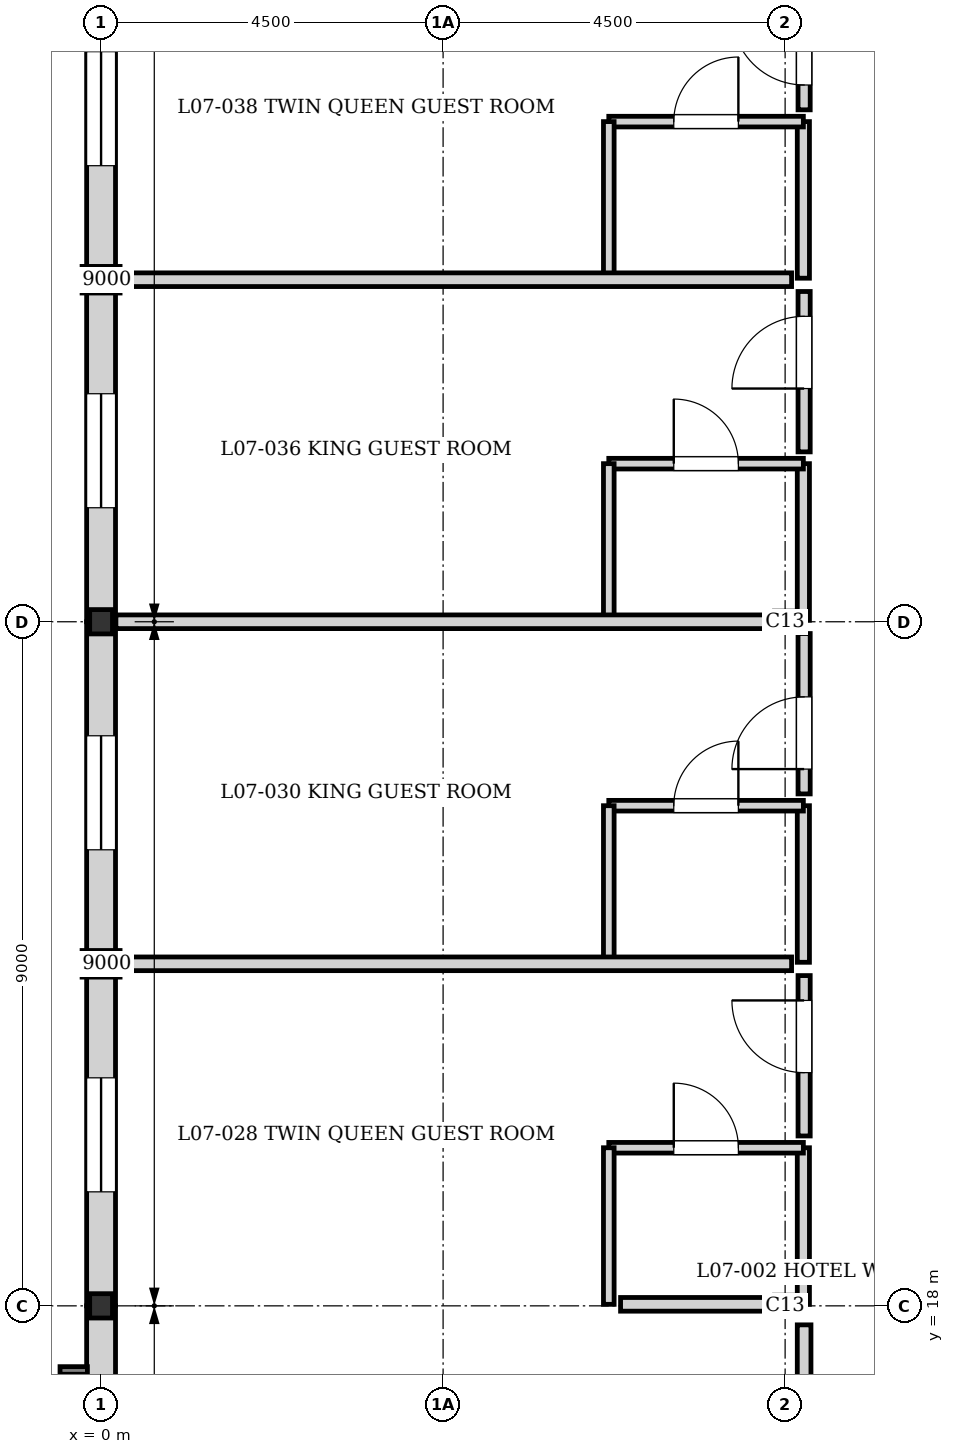
"""IFC4 building model, lengths in metres.
Left out: names, types, materials, properties, quantities, classifications, styles, units other than length and angle.
Written with IfcOpenShell. Run it as: python <this file> out.ifc"""

import sys

from ifc_helpers import new_model, si_unit, direction, frame, frame_2d, origin, origin_2d, place, context, subcontext, project, spatial, rectangle, i_section, extrude, element, fill, save


model = new_model("IFC4")
c1 = context("Model", 3, precision=1e-05, world=origin(), true_north=direction((0.0, 1.0)))
c2 = subcontext(c1, "Body", "Model", "MODEL_VIEW")
j1 = project(units=[si_unit("LENGTHUNIT", "METRE"), si_unit("PLANEANGLEUNIT", "RADIAN")], contexts=[c1])
p1 = place(None, origin())
s1 = spatial("IfcSite", under=j1, at=p1, CompositionType="ELEMENT")
p2 = place(p1, origin())
s2 = spatial("IfcBuilding", under=s1, at=p2, CompositionType="ELEMENT")
p3 = place(p2, frame((0.0, 0.0, 23.68)))
s3 = spatial("IfcBuildingStorey", under=s2, at=p3, CompositionType="ELEMENT", Elevation=23.68)
for number, where, z_axis, x_axis in (
    (1, (0.0, 18.0, 0.0), (0.0, 0.0, 1.0), (1.0, 0.0, 0.0)),
    (2, (0.0, 27.0, 0.0), (0.0, 0.0, 1.0), (1.0, 0.0, 0.0)),
):
    element("IfcColumn", number, at=place(p3, frame(where, z_axis=z_axis, x_axis=x_axis)), inside=s3, PredefinedType="COLUMN", context=c2, shape_type="SweptSolid", body=[
        extrude(i_section(OverallWidth=0.3, OverallDepth=0.32, WebThickness=0.011, FlangeThickness=0.021, at=origin_2d()), origin(), (0.0, 0.0, 1.0), 3.2),
    ])
for number, where, z_axis, x_axis in (
    (3, (9.0, 18.0, 0.0), (0.0, 0.0, 1.0), (1.0, 0.0, 0.0)),
    (4, (9.0, 27.0, 0.0), (0.0, 0.0, 1.0), (1.0, 0.0, 0.0)),
):
    element("IfcColumn", number, at=place(p3, frame(where, z_axis=z_axis, x_axis=x_axis)), inside=s3, PredefinedType="COLUMN", context=c2, shape_type="SweptSolid", body=[
        extrude(i_section(OverallWidth=0.28, OverallDepth=0.28, WebThickness=0.01, FlangeThickness=0.018, at=origin_2d()), origin(), (0.0, 0.0, 1.0), 3.2),
    ])
for number, where, z_axis, x_axis in (
    (5, (0.0, 22.5, 0.0), (0.0, 0.0, 1.0), (0.0, 1.0, 0.0)),
    (6, (0.0, 31.5, 0.0), (0.0, 0.0, 1.0), (0.0, 1.0, 0.0)),
):
    element("IfcColumn", number, at=place(p3, frame(where, z_axis=z_axis, x_axis=x_axis)), inside=s3, PredefinedType="PILASTER", context=c2, shape_type="SweptSolid", body=[
        extrude(rectangle(XDim=0.35, YDim=0.5, at=origin_2d()), origin(), (0.0, 0.0, 1.0), 3.2),
    ])
p4 = place(p3, frame((0.0, 9.0, 0.0), z_axis=(0.0, 0.0, 1.0), x_axis=(0.0, 1.0, 0.0)))
e7 = element("IfcWall", 7, at=p4, inside=s3, PredefinedType="SOLIDWALL", context=c2, shape_type="SweptSolid", body=[
    extrude(rectangle(XDim=9.0, YDim=0.38, at=frame_2d((4.5, 0.0))), origin(), (0.0, 0.0, 1.0), 2.56),
])
p5 = place(p4, frame((1.5, 0.0, 0.35)))
e8 = element("IfcOpeningElement", 8, at=p5, cuts=e7, PredefinedType="OPENING", context=c2, shape_type="SweptSolid", body=[
    extrude(rectangle(XDim=1.5, YDim=1.8, at=frame_2d((0.75, 0.9))), frame((0.0, 0.2, 0.0), z_axis=(0.0, -1.0, 0.0), x_axis=(1.0, 0.0, 0.0)), (0.0, 0.0, 1.0), 0.4),
])
p6 = place(p4, frame((6.0, 0.0, 0.35)))
e9 = element("IfcOpeningElement", 9, at=p6, cuts=e7, PredefinedType="OPENING", context=c2, shape_type="SweptSolid", body=[
    extrude(rectangle(XDim=1.5, YDim=1.8, at=frame_2d((0.75, 0.9))), frame((0.0, 0.2, 0.0), z_axis=(0.0, -1.0, 0.0), x_axis=(1.0, 0.0, 0.0)), (0.0, 0.0, 1.0), 0.4),
])
p7 = place(p3, frame((0.0, 18.0, 0.0), z_axis=(0.0, 0.0, 1.0), x_axis=(0.0, 1.0, 0.0)))
e10 = element("IfcWall", 10, at=p7, inside=s3, PredefinedType="SOLIDWALL", context=c2, shape_type="SweptSolid", body=[
    extrude(rectangle(XDim=9.0, YDim=0.38, at=frame_2d((4.5, 0.0))), origin(), (0.0, 0.0, 1.0), 2.96),
])
p8 = place(p7, frame((1.5, 0.0, 0.35)))
e11 = element("IfcOpeningElement", 11, at=p8, cuts=e10, PredefinedType="OPENING", context=c2, shape_type="SweptSolid", body=[
    extrude(rectangle(XDim=1.5, YDim=1.8, at=frame_2d((0.75, 0.9))), frame((0.0, 0.2, 0.0), z_axis=(0.0, -1.0, 0.0), x_axis=(1.0, 0.0, 0.0)), (0.0, 0.0, 1.0), 0.4),
])
p9 = place(p7, frame((6.0, 0.0, 0.35)))
e12 = element("IfcOpeningElement", 12, at=p9, cuts=e10, PredefinedType="OPENING", context=c2, shape_type="SweptSolid", body=[
    extrude(rectangle(XDim=1.5, YDim=1.8, at=frame_2d((0.75, 0.9))), frame((0.0, 0.2, 0.0), z_axis=(0.0, -1.0, 0.0), x_axis=(1.0, 0.0, 0.0)), (0.0, 0.0, 1.0), 0.4),
])
p10 = place(p3, frame((0.0, 27.0, 0.0), z_axis=(0.0, 0.0, 1.0), x_axis=(0.0, 1.0, 0.0)))
e13 = element("IfcWall", 13, at=p10, inside=s3, PredefinedType="SOLIDWALL", context=c2, shape_type="SweptSolid", body=[
    extrude(rectangle(XDim=8.87, YDim=0.38, at=frame_2d((4.435, 0.0))), origin(), (0.0, 0.0, 1.0), 2.66),
])
p11 = place(p10, frame((1.5, 0.0, 0.35)))
e14 = element("IfcOpeningElement", 14, at=p11, cuts=e13, PredefinedType="OPENING", context=c2, shape_type="SweptSolid", body=[
    extrude(rectangle(XDim=1.5, YDim=1.8, at=frame_2d((0.75, 0.9))), frame((0.0, 0.2, 0.0), z_axis=(0.0, -1.0, 0.0), x_axis=(1.0, 0.0, 0.0)), (0.0, 0.0, 1.0), 0.4),
])
p12 = place(p10, frame((6.0, 0.0, 0.35)))
e15 = element("IfcOpeningElement", 15, at=p12, cuts=e13, PredefinedType="OPENING", context=c2, shape_type="SweptSolid", body=[
    extrude(rectangle(XDim=1.5, YDim=1.8, at=frame_2d((0.75, 0.9))), frame((0.0, 0.2, 0.0), z_axis=(0.0, -1.0, 0.0), x_axis=(1.0, 0.0, 0.0)), (0.0, 0.0, 1.0), 0.4),
])
p13 = place(p3, frame((9.24, 18.02, 0.0), z_axis=(0.0, 0.0, 1.0), x_axis=(0.0, 1.0, 0.0)))
e16 = element("IfcWall", 16, at=p13, inside=s3, PredefinedType="PARTITIONING", context=c2, shape_type="SweptSolid", body=[
    extrude(rectangle(XDim=2.06, YDim=0.16, at=frame_2d((1.03, 0.0))), origin(), (0.0, 0.0, 1.0), 2.96),
])
p14 = place(p3, frame((6.68, 20.08, 0.0), z_axis=(0.0, 0.0, 1.0), x_axis=(1.0, 0.0, 0.0)))
e17 = element("IfcWall", 17, at=p14, inside=s3, PredefinedType="PLUMBINGWALL", context=c2, shape_type="SweptSolid", body=[
    extrude(rectangle(XDim=2.56, YDim=0.14, at=frame_2d((1.28, 0.0))), origin(), (0.0, 0.0, 1.0), 2.96),
])
p15 = place(p14, frame((0.855, 0.0, 0.0)))
e18 = element("IfcOpeningElement", 18, at=p15, cuts=e17, PredefinedType="OPENING", context=c2, shape_type="SweptSolid", body=[
    extrude(rectangle(XDim=0.85, YDim=2.04, at=frame_2d((0.425, 1.02))), frame((0.0, 0.08, 0.0), z_axis=(0.0, -1.0, 0.0), x_axis=(1.0, 0.0, 0.0)), (0.0, 0.0, 1.0), 0.16),
])
p16 = place(p3, frame((6.68, 18.02, 0.0), z_axis=(0.0, 0.0, 1.0), x_axis=(0.0, 1.0, 0.0)))
e19 = element("IfcWall", 19, at=p16, inside=s3, PredefinedType="PLUMBINGWALL", context=c2, shape_type="SweptSolid", body=[
    extrude(rectangle(XDim=2.06, YDim=0.14, at=frame_2d((1.03, 0.0))), origin(), (0.0, 0.0, 1.0), 2.96),
])
p17 = place(p3, frame((9.24, 22.52, 0.0), z_axis=(0.0, 0.0, 1.0), x_axis=(0.0, 1.0, 0.0)))
e20 = element("IfcWall", 20, at=p17, inside=s3, PredefinedType="PARTITIONING", context=c2, shape_type="SweptSolid", body=[
    extrude(rectangle(XDim=2.06, YDim=0.16, at=frame_2d((1.03, 0.0))), origin(), (0.0, 0.0, 1.0), 2.96),
])
p18 = place(p3, frame((6.68, 24.58, 0.0), z_axis=(0.0, 0.0, 1.0), x_axis=(1.0, 0.0, 0.0)))
e21 = element("IfcWall", 21, at=p18, inside=s3, PredefinedType="PLUMBINGWALL", context=c2, shape_type="SweptSolid", body=[
    extrude(rectangle(XDim=2.56, YDim=0.14, at=frame_2d((1.28, 0.0))), origin(), (0.0, 0.0, 1.0), 2.96),
])
p19 = place(p18, frame((0.855, 0.0, 0.0)))
e22 = element("IfcOpeningElement", 22, at=p19, cuts=e21, PredefinedType="OPENING", context=c2, shape_type="SweptSolid", body=[
    extrude(rectangle(XDim=0.85, YDim=2.04, at=frame_2d((0.425, 1.02))), frame((0.0, 0.08, 0.0), z_axis=(0.0, -1.0, 0.0), x_axis=(1.0, 0.0, 0.0)), (0.0, 0.0, 1.0), 0.16),
])
p20 = place(p3, frame((6.68, 22.52, 0.0), z_axis=(0.0, 0.0, 1.0), x_axis=(0.0, 1.0, 0.0)))
e23 = element("IfcWall", 23, at=p20, inside=s3, PredefinedType="PLUMBINGWALL", context=c2, shape_type="SweptSolid", body=[
    extrude(rectangle(XDim=2.06, YDim=0.14, at=frame_2d((1.03, 0.0))), origin(), (0.0, 0.0, 1.0), 2.96),
])
p21 = place(p3, frame((9.24, 27.02, 0.0), z_axis=(0.0, 0.0, 1.0), x_axis=(0.0, 1.0, 0.0)))
e24 = element("IfcWall", 24, at=p21, inside=s3, PredefinedType="PARTITIONING", context=c2, shape_type="SweptSolid", body=[
    extrude(rectangle(XDim=2.06, YDim=0.16, at=frame_2d((1.03, 0.0))), origin(), (0.0, 0.0, 1.0), 2.96),
])
p22 = place(p3, frame((6.68, 29.08, 0.0), z_axis=(0.0, 0.0, 1.0), x_axis=(1.0, 0.0, 0.0)))
e25 = element("IfcWall", 25, at=p22, inside=s3, PredefinedType="PLUMBINGWALL", context=c2, shape_type="SweptSolid", body=[
    extrude(rectangle(XDim=2.56, YDim=0.14, at=frame_2d((1.28, 0.0))), origin(), (0.0, 0.0, 1.0), 2.96),
])
p23 = place(p22, frame((0.855, 0.0, 0.0)))
e26 = element("IfcOpeningElement", 26, at=p23, cuts=e25, PredefinedType="OPENING", context=c2, shape_type="SweptSolid", body=[
    extrude(rectangle(XDim=0.85, YDim=2.04, at=frame_2d((0.425, 1.02))), frame((0.0, 0.08, 0.0), z_axis=(0.0, -1.0, 0.0), x_axis=(1.0, 0.0, 0.0)), (0.0, 0.0, 1.0), 0.16),
])
p24 = place(p3, frame((6.68, 27.02, 0.0), z_axis=(0.0, 0.0, 1.0), x_axis=(0.0, 1.0, 0.0)))
e27 = element("IfcWall", 27, at=p24, inside=s3, PredefinedType="PLUMBINGWALL", context=c2, shape_type="SweptSolid", body=[
    extrude(rectangle(XDim=2.06, YDim=0.14, at=frame_2d((1.03, 0.0))), origin(), (0.0, 0.0, 1.0), 2.96),
])
p25 = place(p3, frame((9.24, 31.52, 0.0), z_axis=(0.0, 0.0, 1.0), x_axis=(0.0, 1.0, 0.0)))
e28 = element("IfcWall", 28, at=p25, inside=s3, PredefinedType="PARTITIONING", context=c2, shape_type="SweptSolid", body=[
    extrude(rectangle(XDim=2.06, YDim=0.16, at=frame_2d((1.03, 0.0))), origin(), (0.0, 0.0, 1.0), 2.96),
])
p26 = place(p3, frame((6.68, 33.58, 0.0), z_axis=(0.0, 0.0, 1.0), x_axis=(1.0, 0.0, 0.0)))
e29 = element("IfcWall", 29, at=p26, inside=s3, PredefinedType="PLUMBINGWALL", context=c2, shape_type="SweptSolid", body=[
    extrude(rectangle(XDim=2.56, YDim=0.14, at=frame_2d((1.28, 0.0))), origin(), (0.0, 0.0, 1.0), 2.96),
])
p27 = place(p26, frame((0.855, 0.0, 0.0)))
e30 = element("IfcOpeningElement", 30, at=p27, cuts=e29, PredefinedType="OPENING", context=c2, shape_type="SweptSolid", body=[
    extrude(rectangle(XDim=0.85, YDim=2.04, at=frame_2d((0.425, 1.02))), frame((0.0, 0.08, 0.0), z_axis=(0.0, -1.0, 0.0), x_axis=(1.0, 0.0, 0.0)), (0.0, 0.0, 1.0), 0.16),
])
p28 = place(p3, frame((6.68, 31.52, 0.0), z_axis=(0.0, 0.0, 1.0), x_axis=(0.0, 1.0, 0.0)))
e31 = element("IfcWall", 31, at=p28, inside=s3, PredefinedType="PLUMBINGWALL", context=c2, shape_type="SweptSolid", body=[
    extrude(rectangle(XDim=2.06, YDim=0.14, at=frame_2d((1.03, 0.0))), origin(), (0.0, 0.0, 1.0), 2.96),
])
p29 = place(p3, frame((9.25, 11.45, 0.0), z_axis=(0.0, 0.0, 1.0), x_axis=(0.0, 1.0, 0.0)))
e32 = element("IfcWall", 32, at=p29, inside=s3, PredefinedType="PARTITIONING", context=c2, shape_type="SweptSolid", body=[
    extrude(rectangle(XDim=6.3, YDim=0.18, at=frame_2d((3.15, 0.0))), origin(), (0.0, 0.0, 1.0), 2.96),
])
p30 = place(p3, frame((0.195, 22.5, 0.0), z_axis=(0.0, 0.0, 1.0), x_axis=(1.0, 0.0, 0.0)))
e33 = element("IfcWall", 33, at=p30, inside=s3, PredefinedType="PARTITIONING", context=c2, shape_type="SweptSolid", body=[
    extrude(rectangle(XDim=8.89, YDim=0.18, at=frame_2d((4.445, 0.0))), origin(), (0.0, 0.0, 1.0), 2.96),
])
p31 = place(p3, frame((0.195, 27.0, 0.0), z_axis=(0.0, 0.0, 1.0), x_axis=(1.0, 0.0, 0.0)))
e34 = element("IfcWall", 34, at=p31, inside=s3, PredefinedType="PARTITIONING", context=c2, shape_type="SweptSolid", body=[
    extrude(rectangle(XDim=8.89, YDim=0.18, at=frame_2d((4.445, 0.0))), origin(), (0.0, 0.0, 1.0), 2.6),
])
p32 = place(p3, frame((0.195, 31.5, 0.0), z_axis=(0.0, 0.0, 1.0), x_axis=(1.0, 0.0, 0.0)))
e35 = element("IfcWall", 35, at=p32, inside=s3, PredefinedType="PARTITIONING", context=c2, shape_type="SweptSolid", body=[
    extrude(rectangle(XDim=8.89, YDim=0.18, at=frame_2d((4.445, 0.0))), origin(), (0.0, 0.0, 1.0), 2.96),
])
p33 = place(p3, frame((6.835, 18.02, 0.0), z_axis=(0.0, 0.0, 1.0), x_axis=(1.0, 0.0, 0.0)))
e36 = element("IfcWall", 36, at=p33, inside=s3, PredefinedType="PARTITIONING", context=c2, shape_type="SweptSolid", body=[
    extrude(rectangle(XDim=2.26, YDim=0.18, at=frame_2d((1.13, 0.0))), origin(), (0.0, 0.0, 1.0), 2.66),
])
p34 = place(p3, frame((9.25, 20.235, 0.0), z_axis=(0.0, 0.0, 1.0), x_axis=(0.0, 1.0, 0.0)))
e37 = element("IfcWall", 37, at=p34, inside=s3, PredefinedType="PARTITIONING", context=c2, shape_type="SweptSolid", body=[
    extrude(rectangle(XDim=2.11, YDim=0.16, at=frame_2d((1.055, 0.0))), origin(), (0.0, 0.0, 1.0), 2.96),
])
p35 = place(p34, frame((0.833, 0.0, 0.0)))
e38 = element("IfcOpeningElement", 38, at=p35, cuts=e37, PredefinedType="OPENING", context=c2, shape_type="SweptSolid", body=[
    extrude(rectangle(XDim=0.95, YDim=2.15, at=frame_2d((0.475, 1.075))), frame((0.0, 0.09, 0.0), z_axis=(0.0, -1.0, 0.0), x_axis=(1.0, 0.0, 0.0)), (0.0, 0.0, 1.0), 0.18),
])
p36 = place(p3, frame((9.25, 24.735, 0.0), z_axis=(0.0, 0.0, 1.0), x_axis=(0.0, 1.0, 0.0)))
e39 = element("IfcWall", 39, at=p36, inside=s3, PredefinedType="PARTITIONING", context=c2, shape_type="SweptSolid", body=[
    extrude(rectangle(XDim=2.11, YDim=0.16, at=frame_2d((1.055, 0.0))), origin(), (0.0, 0.0, 1.0), 2.96),
])
p37 = place(p36, frame((0.327, 0.0, 0.0)))
e40 = element("IfcOpeningElement", 40, at=p37, cuts=e39, PredefinedType="OPENING", context=c2, shape_type="SweptSolid", body=[
    extrude(rectangle(XDim=0.95, YDim=2.15, at=frame_2d((0.475, 1.075))), frame((0.0, 0.09, 0.0), z_axis=(0.0, -1.0, 0.0), x_axis=(1.0, 0.0, 0.0)), (0.0, 0.0, 1.0), 0.18),
])
p38 = place(p3, frame((9.25, 29.235, 0.0), z_axis=(0.0, 0.0, 1.0), x_axis=(0.0, 1.0, 0.0)))
e41 = element("IfcWall", 41, at=p38, inside=s3, PredefinedType="PARTITIONING", context=c2, shape_type="SweptSolid", body=[
    extrude(rectangle(XDim=2.11, YDim=0.16, at=frame_2d((1.055, 0.0))), origin(), (0.0, 0.0, 1.0), 2.96),
])
p39 = place(p38, frame((0.833, 0.0, 0.0)))
e42 = element("IfcOpeningElement", 42, at=p39, cuts=e41, PredefinedType="OPENING", context=c2, shape_type="SweptSolid", body=[
    extrude(rectangle(XDim=0.95, YDim=2.15, at=frame_2d((0.475, 1.075))), frame((0.0, 0.09, 0.0), z_axis=(0.0, -1.0, 0.0), x_axis=(1.0, 0.0, 0.0)), (0.0, 0.0, 1.0), 0.18),
])
p40 = place(p3, frame((9.25, 33.735, 0.0), z_axis=(0.0, 0.0, 1.0), x_axis=(0.0, 1.0, 0.0)))
e43 = element("IfcWall", 43, at=p40, inside=s3, PredefinedType="PARTITIONING", context=c2, shape_type="SweptSolid", body=[
    extrude(rectangle(XDim=2.11, YDim=0.16, at=frame_2d((1.055, 0.0))), origin(), (0.0, 0.0, 1.0), 2.96),
])
p41 = place(p40, frame((0.327, 0.0, 0.0)))
e44 = element("IfcOpeningElement", 44, at=p41, cuts=e43, PredefinedType="OPENING", context=c2, shape_type="SweptSolid", body=[
    extrude(rectangle(XDim=0.95, YDim=2.15, at=frame_2d((0.475, 1.075))), frame((0.0, 0.09, 0.0), z_axis=(0.0, -1.0, 0.0), x_axis=(1.0, 0.0, 0.0)), (0.0, 0.0, 1.0), 0.18),
])
p42 = place(p8, origin())
e45 = element("IfcWindow", 45, at=p42, inside=s3, PartitioningType="SINGLE_PANEL", PredefinedType="WINDOW", context=c2, shape_type="SweptSolid", body=[
    extrude(rectangle(XDim=1.5, YDim=1.8, at=frame_2d((0.75, 0.9))), frame((0.0, 0.03, 0.0), z_axis=(0.0, -1.0, 0.0), x_axis=(1.0, 0.0, 0.0)), (0.0, 0.0, 1.0), 0.06),
])
fill(e11, e45)
p43 = place(p9, origin())
e46 = element("IfcWindow", 46, at=p43, inside=s3, PartitioningType="SINGLE_PANEL", PredefinedType="WINDOW", context=c2, shape_type="SweptSolid", body=[
    extrude(rectangle(XDim=1.5, YDim=1.8, at=frame_2d((0.75, 0.9))), frame((0.0, 0.03, 0.0), z_axis=(0.0, -1.0, 0.0), x_axis=(1.0, 0.0, 0.0)), (0.0, 0.0, 1.0), 0.06),
])
fill(e12, e46)
p44 = place(p11, origin())
e47 = element("IfcWindow", 47, at=p44, inside=s3, PartitioningType="SINGLE_PANEL", PredefinedType="WINDOW", context=c2, shape_type="SweptSolid", body=[
    extrude(rectangle(XDim=1.5, YDim=1.8, at=frame_2d((0.75, 0.9))), frame((0.0, 0.03, 0.0), z_axis=(0.0, -1.0, 0.0), x_axis=(1.0, 0.0, 0.0)), (0.0, 0.0, 1.0), 0.06),
])
fill(e14, e47)
p45 = place(p12, origin())
e48 = element("IfcWindow", 48, at=p45, inside=s3, PartitioningType="SINGLE_PANEL", PredefinedType="WINDOW", context=c2, shape_type="SweptSolid", body=[
    extrude(rectangle(XDim=1.5, YDim=1.8, at=frame_2d((0.75, 0.9))), frame((0.0, 0.03, 0.0), z_axis=(0.0, -1.0, 0.0), x_axis=(1.0, 0.0, 0.0)), (0.0, 0.0, 1.0), 0.06),
])
fill(e15, e48)
p46 = place(p15, origin())
e49 = element("IfcDoor", 49, at=p46, inside=s3, OperationType="SINGLE_SWING_LEFT", PredefinedType="DOOR", context=c2, shape_type="SweptSolid", body=[
    extrude(rectangle(XDim=0.85, YDim=2.04, at=frame_2d((0.425, 1.02))), frame((0.0, 0.025, 0.0), z_axis=(0.0, -1.0, 0.0), x_axis=(1.0, 0.0, 0.0)), (0.0, 0.0, 1.0), 0.05),
])
fill(e18, e49)
p47 = place(p19, origin())
e50 = element("IfcDoor", 50, at=p47, inside=s3, OperationType="SINGLE_SWING_RIGHT", PredefinedType="DOOR", context=c2, shape_type="SweptSolid", body=[
    extrude(rectangle(XDim=0.85, YDim=2.04, at=frame_2d((0.425, 1.02))), frame((0.0, 0.025, 0.0), z_axis=(0.0, -1.0, 0.0), x_axis=(1.0, 0.0, 0.0)), (0.0, 0.0, 1.0), 0.05),
])
fill(e22, e50)
p48 = place(p23, origin())
e51 = element("IfcDoor", 51, at=p48, inside=s3, OperationType="SINGLE_SWING_LEFT", PredefinedType="DOOR", context=c2, shape_type="SweptSolid", body=[
    extrude(rectangle(XDim=0.85, YDim=2.04, at=frame_2d((0.425, 1.02))), frame((0.0, 0.025, 0.0), z_axis=(0.0, -1.0, 0.0), x_axis=(1.0, 0.0, 0.0)), (0.0, 0.0, 1.0), 0.05),
])
fill(e26, e51)
p49 = place(p27, origin())
e52 = element("IfcDoor", 52, at=p49, inside=s3, OperationType="SINGLE_SWING_RIGHT", PredefinedType="DOOR", context=c2, shape_type="SweptSolid", body=[
    extrude(rectangle(XDim=0.85, YDim=2.04, at=frame_2d((0.425, 1.02))), frame((0.0, 0.025, 0.0), z_axis=(0.0, -1.0, 0.0), x_axis=(1.0, 0.0, 0.0)), (0.0, 0.0, 1.0), 0.05),
])
fill(e30, e52)
p50 = place(p35, origin())
e53 = element("IfcDoor", 53, at=p50, inside=s3, OperationType="SINGLE_SWING_RIGHT", PredefinedType="DOOR", context=c2, shape_type="SweptSolid", body=[
    extrude(rectangle(XDim=0.95, YDim=2.15, at=frame_2d((0.475, 1.075))), frame((0.0, 0.025, 0.0), z_axis=(0.0, -1.0, 0.0), x_axis=(1.0, 0.0, 0.0)), (0.0, 0.0, 1.0), 0.05),
])
fill(e38, e53)
p51 = place(p37, origin())
e54 = element("IfcDoor", 54, at=p51, inside=s3, OperationType="SINGLE_SWING_LEFT", PredefinedType="DOOR", context=c2, shape_type="SweptSolid", body=[
    extrude(rectangle(XDim=0.95, YDim=2.15, at=frame_2d((0.475, 1.075))), frame((0.0, 0.025, 0.0), z_axis=(0.0, -1.0, 0.0), x_axis=(1.0, 0.0, 0.0)), (0.0, 0.0, 1.0), 0.05),
])
fill(e40, e54)
p52 = place(p39, origin())
e55 = element("IfcDoor", 55, at=p52, inside=s3, OperationType="SINGLE_SWING_LEFT", PredefinedType="DOOR", context=c2, shape_type="SweptSolid", body=[
    extrude(rectangle(XDim=0.95, YDim=2.15, at=frame_2d((0.475, 1.075))), frame((0.0, 0.025, 0.0), z_axis=(0.0, -1.0, 0.0), x_axis=(1.0, 0.0, 0.0)), (0.0, 0.0, 1.0), 0.05),
])
fill(e42, e55)
p53 = place(p41, origin())
e56 = element("IfcDoor", 56, at=p53, inside=s3, OperationType="SINGLE_SWING_RIGHT", PredefinedType="DOOR", context=c2, shape_type="SweptSolid", body=[
    extrude(rectangle(XDim=0.95, YDim=2.15, at=frame_2d((0.475, 1.075))), frame((0.0, 0.025, 0.0), z_axis=(0.0, -1.0, 0.0), x_axis=(1.0, 0.0, 0.0)), (0.0, 0.0, 1.0), 0.05),
])
fill(e44, e56)
save(model, sys.argv[1])
